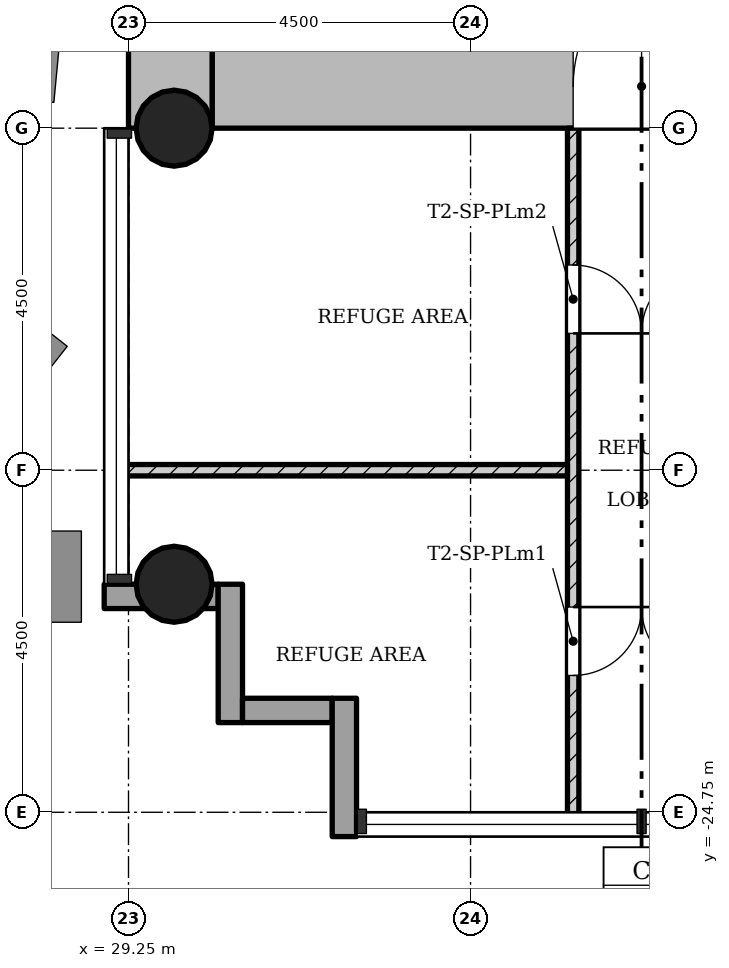
"""IFC4 building model, lengths in metres.
Left out: names, types, materials, properties, quantities, classifications, styles, units other than length and angle.
Written with IfcOpenShell. Run it as: python <this file> out.ifc"""

import sys

from ifc_helpers import new_model, si_unit, direction, frame, frame_2d, origin, origin_2d, place, context, subcontext, project, spatial, rectangle, hollow_circle, extrude, element, fill, save


model = new_model("IFC4")
c1 = context("Model", 3, precision=1e-05, world=origin(), true_north=direction((0.0, 1.0)))
c2 = subcontext(c1, "Body", "Model", "MODEL_VIEW")
j1 = project(units=[si_unit("LENGTHUNIT", "METRE"), si_unit("PLANEANGLEUNIT", "RADIAN")], contexts=[c1])
p1 = place(None, origin())
s1 = spatial("IfcSite", under=j1, at=p1, CompositionType="ELEMENT")
p2 = place(p1, origin())
s2 = spatial("IfcBuilding", under=s1, at=p2, CompositionType="ELEMENT")
p3 = place(p2, frame((0.0, 0.0, 72.1)))
s3 = spatial("IfcBuildingStorey", under=s2, at=p3, CompositionType="ELEMENT", Elevation=72.1)
p4 = place(p3, frame((30.35, -15.2, 0.0), z_axis=(0.0, 0.0, 1.0), x_axis=(1.0, 0.0, 0.0)))
e1 = element("IfcWall", 1, at=p4, inside=s3, PredefinedType="SHEAR", context=c2, shape_type="SweptSolid", body=[
    extrude(rectangle(XDim=12.4, YDim=1.1, at=frame_2d((6.2, 0.0))), origin(), (0.0, 0.0, 1.0), 4.5),
])
p5 = place(p4, frame((4.75, 0.0, 0.0)))
e2 = element("IfcOpeningElement", 2, at=p5, cuts=e1, PredefinedType="OPENING", context=c2, shape_type="SweptSolid", body=[
    extrude(rectangle(XDim=1.8, YDim=2.1, at=frame_2d((0.9, 1.05))), frame((0.0, 0.56, 0.0), z_axis=(0.0, -1.0, 0.0), x_axis=(1.0, 0.0, 0.0)), (0.0, 0.0, 1.0), 1.12),
])
p6 = place(p3, frame((29.8, -7.85, 0.0), z_axis=(0.0, 0.0, 1.0), x_axis=(0.0, -1.0, 0.0)))
e3 = element("IfcWall", 3, at=p6, inside=s3, PredefinedType="SHEAR", context=c2, shape_type="SweptSolid", body=[
    extrude(rectangle(XDim=7.9, YDim=1.1, at=frame_2d((3.95, 0.0))), origin(), (0.0, 0.0, 1.0), 4.5),
])
for number, where, z_axis, x_axis in (
    (4, (29.85, -15.75, 0.0), (0.0, 0.0, 1.0), (1.0, 0.0, 0.0)),
    (5, (29.85, -21.75, 0.0), (0.0, 0.0, 1.0), (1.0, 0.0, 0.0)),
):
    element("IfcColumn", number, at=place(p3, frame(where, z_axis=z_axis, x_axis=x_axis)), inside=s3, PredefinedType="COLUMN", context=c2, shape_type="SweptSolid", body=[
        extrude(hollow_circle(Radius=0.5, WallThickness=0.036, at=origin_2d()), origin(), (0.0, 0.0, 1.0), 4.5),
    ])
p7 = place(p3, frame((28.93, -21.91, -0.3), z_axis=(0.0, 0.0, 1.0), x_axis=(1.0, 0.0, 0.0)))
e6 = element("IfcWall", 6, at=p7, inside=s3, PredefinedType="STANDARD", context=c2, shape_type="SweptSolid", body=[
    extrude(rectangle(XDim=1.5, YDim=0.32, at=frame_2d((0.75, 0.0))), origin(), (0.0, 0.0, 1.0), 4.5),
])
p8 = place(p3, frame((30.59, -21.75, -0.3), z_axis=(0.0, 0.0, 1.0), x_axis=(0.0, -1.0, 0.0)))
e7 = element("IfcWall", 7, at=p8, inside=s3, PredefinedType="STANDARD", context=c2, shape_type="SweptSolid", body=[
    extrude(rectangle(XDim=1.82, YDim=0.32, at=frame_2d((0.91, 0.0))), origin(), (0.0, 0.0, 1.0), 4.5),
])
p9 = place(p3, frame((30.75, -23.41, -0.3), z_axis=(0.0, 0.0, 1.0), x_axis=(1.0, 0.0, 0.0)))
e8 = element("IfcWall", 8, at=p9, inside=s3, PredefinedType="STANDARD", context=c2, shape_type="SweptSolid", body=[
    extrude(rectangle(XDim=1.18, YDim=0.32, at=frame_2d((0.59, 0.0))), origin(), (0.0, 0.0, 1.0), 4.5),
])
p10 = place(p3, frame((32.09, -23.25, -0.3), z_axis=(0.0, 0.0, 1.0), x_axis=(0.0, -1.0, 0.0)))
e9 = element("IfcWall", 9, at=p10, inside=s3, PredefinedType="STANDARD", context=c2, shape_type="SweptSolid", body=[
    extrude(rectangle(XDim=1.82, YDim=0.32, at=frame_2d((0.91, 0.0))), origin(), (0.0, 0.0, 1.0), 4.5),
])
p11 = place(p3, frame((35.1, -24.85, 0.0), z_axis=(0.0, 0.0, 1.0), x_axis=(0.0, 1.0, 0.0)))
e10 = element("IfcWall", 10, at=p11, inside=s3, PredefinedType="PARTITIONING", context=c2, shape_type="SweptSolid", body=[
    extrude(rectangle(XDim=9.1, YDim=0.15, at=frame_2d((4.55, 0.0))), origin(), (0.0, 0.0, 1.0), 4.08),
])
p12 = place(p11, frame((1.9, 0.0, 0.0)))
e11 = element("IfcOpeningElement", 11, at=p12, cuts=e10, PredefinedType="OPENING", context=c2, shape_type="SweptSolid", body=[
    extrude(rectangle(XDim=0.9, YDim=2.1, at=frame_2d((0.45, 1.05))), frame((0.0, 0.085, 0.0), z_axis=(0.0, -1.0, 0.0), x_axis=(1.0, 0.0, 0.0)), (0.0, 0.0, 1.0), 0.17),
])
p13 = place(p11, frame((6.4, 0.0, 0.0)))
e12 = element("IfcOpeningElement", 12, at=p13, cuts=e10, PredefinedType="OPENING", context=c2, shape_type="SweptSolid", body=[
    extrude(rectangle(XDim=0.9, YDim=2.1, at=frame_2d((0.45, 1.05))), frame((0.0, 0.085, 0.0), z_axis=(0.0, -1.0, 0.0), x_axis=(1.0, 0.0, 0.0)), (0.0, 0.0, 1.0), 0.17),
])
p14 = place(p3, frame((35.025, -20.25, 0.0), z_axis=(0.0, 0.0, 1.0), x_axis=(-1.0, 0.0, 0.0)))
e13 = element("IfcWall", 13, at=p14, inside=s3, PredefinedType="PARTITIONING", context=c2, shape_type="SweptSolid", body=[
    extrude(rectangle(XDim=5.875, YDim=0.15, at=frame_2d((2.938, 0.0))), origin(), (0.0, 0.0, 1.0), 4.08),
])
p15 = place(p12, origin())
e14 = element("IfcDoor", 14, at=p15, inside=s3, OperationType="SINGLE_SWING_RIGHT", PredefinedType="DOOR", context=c2, shape_type="SweptSolid", body=[
    extrude(rectangle(XDim=0.9, YDim=2.1, at=frame_2d((0.45, 1.05))), frame((0.0, 0.025, 0.0), z_axis=(0.0, -1.0, 0.0), x_axis=(1.0, 0.0, 0.0)), (0.0, 0.0, 1.0), 0.05),
])
fill(e11, e14)
p16 = place(p13, origin())
e15 = element("IfcDoor", 15, at=p16, inside=s3, OperationType="SINGLE_SWING_LEFT", PredefinedType="DOOR", context=c2, shape_type="SweptSolid", body=[
    extrude(rectangle(XDim=0.9, YDim=2.1, at=frame_2d((0.45, 1.05))), frame((0.0, 0.025, 0.0), z_axis=(0.0, -1.0, 0.0), x_axis=(1.0, 0.0, 0.0)), (0.0, 0.0, 1.0), 0.05),
])
fill(e12, e15)
p17 = place(p5, origin())
e16 = element("IfcDoor", 16, at=p17, inside=s3, OperationType="SINGLE_SWING_LEFT", PredefinedType="DOOR", context=c2, shape_type="SweptSolid", body=[
    extrude(rectangle(XDim=1.8, YDim=2.1, at=frame_2d((0.9, 1.05))), frame((0.0, 0.025, 0.0), z_axis=(0.0, -1.0, 0.0), x_axis=(1.0, 0.0, 0.0)), (0.0, 0.0, 1.0), 0.05),
])
fill(e2, e16)
save(model, sys.argv[1])
